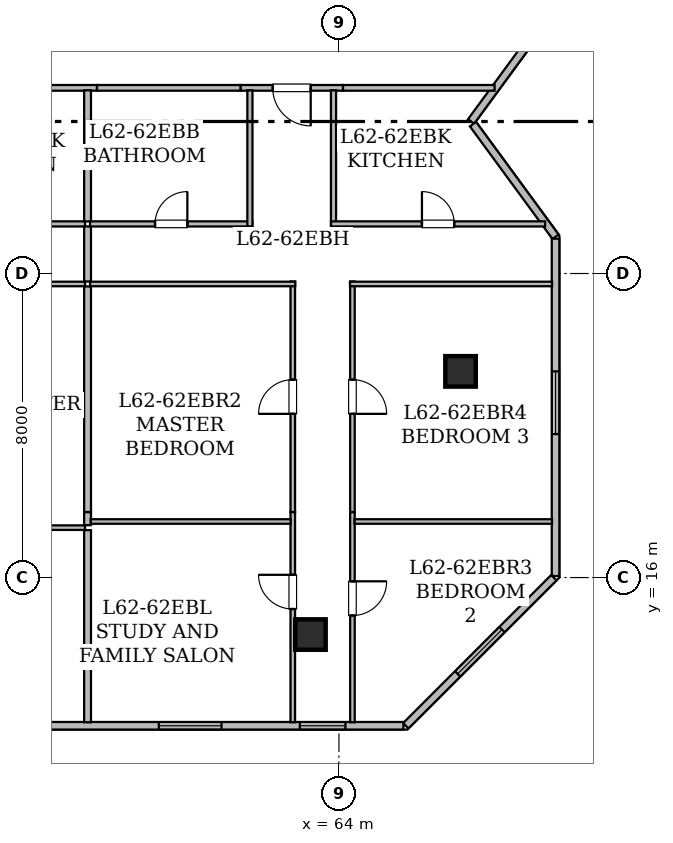
"""IFC4 building model, lengths in metres.
Left out: names, types, materials, properties, quantities, classifications, styles, units other than length and angle.
Written with IfcOpenShell. Run it as: python <this file> out.ifc"""

import sys

from ifc_helpers import new_model, si_unit, direction, frame, frame_2d, origin, origin_2d, place, context, subcontext, project, spatial, rectangle, hollow_rectangle, extrude, element, fill, save


model = new_model("IFC4")
c1 = context("Model", 3, precision=1e-05, world=origin(), true_north=direction((0.0, 1.0)))
c2 = subcontext(c1, "Body", "Model", "MODEL_VIEW")
j1 = project(units=[si_unit("LENGTHUNIT", "METRE"), si_unit("PLANEANGLEUNIT", "RADIAN")], contexts=[c1])
p1 = place(None, origin())
s1 = spatial("IfcSite", under=j1, at=p1, CompositionType="ELEMENT")
p2 = place(p1, origin())
s2 = spatial("IfcBuilding", under=s1, at=p2, CompositionType="ELEMENT")
p3 = place(p2, frame((0.0, 0.0, 242.75)))
s3 = spatial("IfcBuildingStorey", under=s2, at=p3, CompositionType="ELEMENT", Elevation=242.75)
for number, where, z_axis, x_axis in (
    (1, (63.25, 14.5, 0.0), (0.0, 0.0, 1.0), (1.0, 0.0, 0.0)),
    (2, (67.2, 21.425, 0.0), (0.0, 0.0, 1.0), (1.0, 0.0, 0.0)),
):
    element("IfcColumn", number, at=place(p3, frame(where, z_axis=z_axis, x_axis=x_axis)), inside=s3, PredefinedType="COLUMN", context=c2, shape_type="SweptSolid", body=[
        extrude(hollow_rectangle(XDim=0.8, YDim=0.8, WallThickness=0.04, at=origin_2d()), origin(), (0.0, 0.0, 1.0), 3.65),
    ])
p4 = place(p3, frame((69.67, 30.992, 0.0), z_axis=(0.0, 0.0, 1.0), x_axis=(-0.591320870733, -0.806436375566, 0.0)))
e3 = element("IfcWall", 3, at=p4, inside=s3, PredefinedType="STANDARD", context=c2, shape_type="SweptSolid", body=[
    extrude(rectangle(XDim=3.71, YDim=0.2, at=frame_2d((1.855, 0.0))), origin(), (0.0, 0.0, 1.0), 3.43),
])
p5 = place(p3, frame((67.527, 27.931, 0.0), z_axis=(0.0, 0.0, 1.0), x_axis=(0.591248456881, -0.80648946815, 0.0)))
e4 = element("IfcWall", 4, at=p5, inside=s3, PredefinedType="STANDARD", context=c2, shape_type="SweptSolid", body=[
    extrude(rectangle(XDim=3.675, YDim=0.2, at=frame_2d((1.837, 0.0))), origin(), (0.0, 0.0, 1.0), 3.43),
])
p6 = place(p3, frame((69.7, 24.916, 0.0), z_axis=(0.0, 0.0, 1.0), x_axis=(0.0, -1.0, 0.0)))
e5 = element("IfcWall", 5, at=p6, inside=s3, PredefinedType="STANDARD", context=c2, shape_type="SweptSolid", body=[
    extrude(rectangle(XDim=8.875, YDim=0.2, at=frame_2d((4.438, 0.0))), origin(), (0.0, 0.0, 1.0), 3.43),
])
p7 = place(p6, frame((3.491, 0.0, 0.85)))
e6 = element("IfcOpeningElement", 6, at=p7, cuts=e5, PredefinedType="OPENING", context=c2, shape_type="SweptSolid", body=[
    extrude(rectangle(XDim=1.65, YDim=1.55, at=frame_2d((0.825, 0.775))), frame((0.0, 0.11, 0.0), z_axis=(0.0, -1.0, 0.0), x_axis=(1.0, 0.0, 0.0)), (0.0, 0.0, 1.0), 0.22),
])
p8 = place(p3, frame((69.655, 15.996, 0.0), z_axis=(0.0, 0.0, 1.0), x_axis=(-0.707106781187, -0.707106781187, 0.0)))
e7 = element("IfcWall", 7, at=p8, inside=s3, PredefinedType="STANDARD", context=c2, shape_type="SweptSolid", body=[
    extrude(rectangle(XDim=5.51, YDim=0.2, at=frame_2d((2.755, 0.0))), origin(), (0.0, 0.0, 1.0), 3.43),
])
p9 = place(p8, frame((1.93, 0.0, 0.85)))
e8 = element("IfcOpeningElement", 8, at=p9, cuts=e7, PredefinedType="OPENING", context=c2, shape_type="SweptSolid", body=[
    extrude(rectangle(XDim=1.65, YDim=1.55, at=frame_2d((0.825, 0.775))), frame((0.0, 0.11, 0.0), z_axis=(0.0, -1.0, 0.0), x_axis=(1.0, 0.0, 0.0)), (0.0, 0.0, 1.0), 0.22),
])
p10 = place(p3, frame((65.696, 12.1, 0.0), z_axis=(0.0, 0.0, 1.0), x_axis=(-1.0, 0.0, 0.0)))
e9 = element("IfcWall", 9, at=p10, inside=s3, PredefinedType="STANDARD", context=c2, shape_type="SweptSolid", body=[
    extrude(rectangle(XDim=41.393, YDim=0.2, at=frame_2d((20.697, 0.0))), origin(), (0.0, 0.0, 1.0), 3.43),
])
p11 = place(p10, frame((39.16, 0.0, 0.85)))
e10 = element("IfcOpeningElement", 10, at=p11, cuts=e9, PredefinedType="OPENING", context=c2, shape_type="SweptSolid", body=[
    extrude(rectangle(XDim=1.65, YDim=1.55, at=frame_2d((0.825, 0.775))), frame((0.0, 0.11, 0.0), z_axis=(0.0, -1.0, 0.0), x_axis=(1.0, 0.0, 0.0)), (0.0, 0.0, 1.0), 0.22),
])
p12 = place(p10, frame((30.646, 0.0, 0.85)))
e11 = element("IfcOpeningElement", 11, at=p12, cuts=e9, PredefinedType="OPENING", context=c2, shape_type="SweptSolid", body=[
    extrude(rectangle(XDim=1.65, YDim=1.55, at=frame_2d((0.825, 0.775))), frame((0.0, 0.11, 0.0), z_axis=(0.0, -1.0, 0.0), x_axis=(1.0, 0.0, 0.0)), (0.0, 0.0, 1.0), 0.22),
])
p13 = place(p10, frame((25.339, 0.0, 0.85)))
e12 = element("IfcOpeningElement", 12, at=p13, cuts=e9, PredefinedType="OPENING", context=c2, shape_type="SweptSolid", body=[
    extrude(rectangle(XDim=1.65, YDim=1.55, at=frame_2d((0.825, 0.775))), frame((0.0, 0.11, 0.0), z_axis=(0.0, -1.0, 0.0), x_axis=(1.0, 0.0, 0.0)), (0.0, 0.0, 1.0), 0.22),
])
p14 = place(p10, frame((15.596, 0.0, 0.8)))
e13 = element("IfcOpeningElement", 13, at=p14, cuts=e9, PredefinedType="OPENING", context=c2, shape_type="SweptSolid", body=[
    extrude(rectangle(XDim=1.2, YDim=1.5, at=frame_2d((0.6, 0.75))), frame((0.0, 0.11, 0.0), z_axis=(0.0, -1.0, 0.0), x_axis=(1.0, 0.0, 0.0)), (0.0, 0.0, 1.0), 0.22),
])
p15 = place(p10, frame((19.706, 0.0, 0.85)))
e14 = element("IfcOpeningElement", 14, at=p15, cuts=e9, PredefinedType="OPENING", context=c2, shape_type="SweptSolid", body=[
    extrude(rectangle(XDim=1.65, YDim=1.55, at=frame_2d((0.825, 0.775))), frame((0.0, 0.11, 0.0), z_axis=(0.0, -1.0, 0.0), x_axis=(1.0, 0.0, 0.0)), (0.0, 0.0, 1.0), 0.22),
])
p16 = place(p10, frame((11.036, 0.0, 0.85)))
e15 = element("IfcOpeningElement", 15, at=p16, cuts=e9, PredefinedType="OPENING", context=c2, shape_type="SweptSolid", body=[
    extrude(rectangle(XDim=1.65, YDim=1.55, at=frame_2d((0.825, 0.775))), frame((0.0, 0.11, 0.0), z_axis=(0.0, -1.0, 0.0), x_axis=(1.0, 0.0, 0.0)), (0.0, 0.0, 1.0), 0.22),
])
p17 = place(p10, frame((1.526, 0.0, 0.8)))
e16 = element("IfcOpeningElement", 16, at=p17, cuts=e9, PredefinedType="OPENING", context=c2, shape_type="SweptSolid", body=[
    extrude(rectangle(XDim=1.2, YDim=1.5, at=frame_2d((0.6, 0.75))), frame((0.0, 0.11, 0.0), z_axis=(0.0, -1.0, 0.0), x_axis=(1.0, 0.0, 0.0)), (0.0, 0.0, 1.0), 0.22),
])
p18 = place(p10, frame((4.786, 0.0, 0.85)))
e17 = element("IfcOpeningElement", 17, at=p18, cuts=e9, PredefinedType="OPENING", context=c2, shape_type="SweptSolid", body=[
    extrude(rectangle(XDim=1.65, YDim=1.55, at=frame_2d((0.825, 0.775))), frame((0.0, 0.11, 0.0), z_axis=(0.0, -1.0, 0.0), x_axis=(1.0, 0.0, 0.0)), (0.0, 0.0, 1.0), 0.22),
])
p19 = place(p3, frame((57.634, 28.885, 0.0), z_axis=(0.0, 0.0, 1.0), x_axis=(-1.0, 0.0, 0.0)))
e18 = element("IfcWall", 18, at=p19, inside=s3, PredefinedType="STANDARD", context=c2, shape_type="SweptSolid", body=[
    extrude(rectangle(XDim=7.935, YDim=0.15, at=frame_2d((3.968, 0.0))), origin(), (0.0, 0.0, 1.0), 2.725),
])
p20 = place(p3, frame((64.107, 28.885, 0.0), z_axis=(0.0, 0.0, 1.0), x_axis=(-1.0, 0.0, 0.0)))
e19 = element("IfcWall", 19, at=p20, inside=s3, PredefinedType="STANDARD", context=c2, shape_type="SweptSolid", body=[
    extrude(rectangle(XDim=2.699, YDim=0.15, at=frame_2d((1.35, 0.0))), origin(), (0.0, 0.0, 1.0), 3.43),
])
p21 = place(p20, frame((0.85, 0.0, 0.0)))
e20 = element("IfcOpeningElement", 20, at=p21, cuts=e19, PredefinedType="OPENING", context=c2, shape_type="SweptSolid", body=[
    extrude(rectangle(XDim=1.0, YDim=2.15, at=frame_2d((0.5, 1.075))), frame((0.0, 0.085, 0.0), z_axis=(0.0, -1.0, 0.0), x_axis=(1.0, 0.0, 0.0)), (0.0, 0.0, 1.0), 0.17),
])
p22 = place(p3, frame((61.408, 28.885, 0.0), z_axis=(0.0, 0.0, 1.0), x_axis=(-1.0, 0.0, 0.0)))
e21 = element("IfcWall", 21, at=p22, inside=s3, PredefinedType="STANDARD", context=c2, shape_type="SweptSolid", body=[
    extrude(rectangle(XDim=3.774, YDim=0.15, at=frame_2d((1.887, 0.0))), origin(), (0.0, 0.0, 1.0), 3.43),
])
p23 = place(p3, frame((68.096, 28.885, 0.0), z_axis=(0.0, 0.0, 1.0), x_axis=(-1.0, 0.0, 0.0)))
e22 = element("IfcWall", 22, at=p23, inside=s3, PredefinedType="STANDARD", context=c2, shape_type="SweptSolid", body=[
    extrude(rectangle(XDim=3.989, YDim=0.15, at=frame_2d((1.995, 0.0))), origin(), (0.0, 0.0, 1.0), 2.887),
])
p24 = place(p3, frame((49.385, 25.305, 0.0), z_axis=(0.0, 0.0, 1.0), x_axis=(1.0, 0.0, 0.0)))
e23 = element("IfcWall", 23, at=p24, inside=s3, PredefinedType="PARTITIONING", context=c2, shape_type="SweptSolid", body=[
    extrude(rectangle(XDim=7.935, YDim=0.135, at=frame_2d((3.968, 0.0))), origin(), (0.0, 0.0, 1.0), 2.725),
])
p25 = place(p24, frame((3.542, 0.0, 0.0)))
e24 = element("IfcOpeningElement", 24, at=p25, cuts=e23, PredefinedType="OPENING", context=c2, shape_type="SweptSolid", body=[
    extrude(rectangle(XDim=0.85, YDim=2.1, at=frame_2d((0.425, 1.05))), frame((0.0, 0.077, 0.0), z_axis=(0.0, -1.0, 0.0), x_axis=(1.0, 0.0, 0.0)), (0.0, 0.0, 1.0), 0.155),
])
p26 = place(p3, frame((57.32, 23.725, 0.0), z_axis=(0.0, 0.0, 1.0), x_axis=(-1.0, 0.0, 0.0)))
e25 = element("IfcWall", 25, at=p26, inside=s3, PredefinedType="PARTITIONING", context=c2, shape_type="SweptSolid", body=[
    extrude(rectangle(XDim=7.1, YDim=0.12, at=frame_2d((3.55, 0.0))), origin(), (0.0, 0.0, 1.0), 2.725),
])
p27 = place(p26, frame((3.1, 0.0, 0.0)))
e26 = element("IfcOpeningElement", 26, at=p27, cuts=e25, PredefinedType="OPENING", context=c2, shape_type="SweptSolid", body=[
    extrude(rectangle(XDim=0.9, YDim=2.1, at=frame_2d((0.45, 1.05))), frame((0.0, 0.07, 0.0), z_axis=(0.0, -1.0, 0.0), x_axis=(1.0, 0.0, 0.0)), (0.0, 0.0, 1.0), 0.14),
])
p28 = place(p3, frame((57.385, 25.24, 0.0), z_axis=(0.0, 0.0, 1.0), x_axis=(0.0, -1.0, 0.0)))
e27 = element("IfcWall", 27, at=p28, inside=s3, PredefinedType="STANDARD", context=c2, shape_type="SweptSolid", body=[
    extrude(rectangle(XDim=1.45, YDim=0.18, at=frame_2d((0.725, 0.0))), origin(), (0.0, 0.0, 1.0), 3.43),
])
p29 = place(p3, frame((57.385, 28.82, 0.0), z_axis=(0.0, 0.0, 1.0), x_axis=(0.0, -1.0, 0.0)))
e28 = element("IfcWall", 28, at=p29, inside=s3, PredefinedType="STANDARD", context=c2, shape_type="SweptSolid", body=[
    extrude(rectangle(XDim=3.45, YDim=0.18, at=frame_2d((1.725, 0.0))), origin(), (0.0, 0.0, 1.0), 3.43),
])
p30 = place(p3, frame((50.339, 17.313, 0.0), z_axis=(0.0, 0.0, 1.0), x_axis=(1.0, 0.0, 0.0)))
e29 = element("IfcWall", 29, at=p30, inside=s3, PredefinedType="PARTITIONING", context=c2, shape_type="SweptSolid", body=[
    extrude(rectangle(XDim=6.981, YDim=0.12, at=frame_2d((3.49, 0.0))), origin(), (0.0, 0.0, 1.0), 2.725),
])
p31 = place(p3, frame((57.385, 17.248, 0.0), z_axis=(0.0, 0.0, 1.0), x_axis=(0.0, -1.0, 0.0)))
e30 = element("IfcWall", 30, at=p31, inside=s3, PredefinedType="STANDARD", context=c2, shape_type="SweptSolid", body=[
    extrude(rectangle(XDim=5.056, YDim=0.18, at=frame_2d((2.528, 0.0))), origin(), (0.0, 0.0, 1.0), 2.725),
])
p32 = place(p3, frame((57.385, 17.724, 0.0), z_axis=(0.0, 0.0, 1.0), x_axis=(0.0, -1.0, 0.0)))
e31 = element("IfcWall", 31, at=p32, inside=s3, PredefinedType="STANDARD", context=c2, shape_type="SweptSolid", body=[
    extrude(rectangle(XDim=0.346, YDim=0.18, at=frame_2d((0.173, 0.0))), origin(), (0.0, 0.0, 1.0), 3.43),
])
p33 = place(p3, frame((57.385, 23.66, 0.0), z_axis=(0.0, 0.0, 1.0), x_axis=(0.0, -1.0, 0.0)))
e32 = element("IfcWall", 32, at=p33, inside=s3, PredefinedType="STANDARD", context=c2, shape_type="SweptSolid", body=[
    extrude(rectangle(XDim=5.936, YDim=0.18, at=frame_2d((2.968, 0.0))), origin(), (0.0, 0.0, 1.0), 2.725),
])
p34 = place(p3, frame((57.45, 25.305, 0.0), z_axis=(0.0, 0.0, 1.0), x_axis=(1.0, 0.0, 0.0)))
e33 = element("IfcWall", 33, at=p34, inside=s3, PredefinedType="PARTITIONING", context=c2, shape_type="SweptSolid", body=[
    extrude(rectangle(XDim=4.272, YDim=0.135, at=frame_2d((2.136, 0.0))), origin(), (0.0, 0.0, 1.0), 3.43),
])
p35 = place(p34, frame((1.711, 0.0, 0.0)))
e34 = element("IfcOpeningElement", 34, at=p35, cuts=e33, PredefinedType="OPENING", context=c2, shape_type="SweptSolid", body=[
    extrude(rectangle(XDim=0.85, YDim=2.1, at=frame_2d((0.425, 1.05))), frame((0.0, 0.077, 0.0), z_axis=(0.0, -1.0, 0.0), x_axis=(1.0, 0.0, 0.0)), (0.0, 0.0, 1.0), 0.155),
])
for number, where, z_axis, x_axis in (
    (35, (61.657, 25.24, 0.0), (0.0, 0.0, 1.0), (0.0, 1.0, 0.0)),
    (36, (63.857, 28.82, 0.0), (0.0, 0.0, 1.0), (0.0, -1.0, 0.0)),
):
    element("IfcWall", number, at=place(p3, frame(where, z_axis=z_axis, x_axis=x_axis)), inside=s3, PredefinedType="PARTITIONING", context=c2, shape_type="SweptSolid", body=[
        extrude(rectangle(XDim=3.58, YDim=0.135, at=frame_2d((1.79, 0.0))), origin(), (0.0, 0.0, 1.0), 3.43),
    ])
p36 = place(p3, frame((63.792, 25.305, 0.0), z_axis=(0.0, 0.0, 1.0), x_axis=(1.0, 0.0, 0.0)))
e37 = element("IfcWall", 37, at=p36, inside=s3, PredefinedType="PARTITIONING", context=c2, shape_type="SweptSolid", body=[
    extrude(rectangle(XDim=5.633, YDim=0.135, at=frame_2d((2.816, 0.0))), origin(), (0.0, 0.0, 1.0), 2.887),
])
p37 = place(p36, frame((2.392, 0.0, 0.0)))
e38 = element("IfcOpeningElement", 38, at=p37, cuts=e37, PredefinedType="OPENING", context=c2, shape_type="SweptSolid", body=[
    extrude(rectangle(XDim=0.85, YDim=2.1, at=frame_2d((0.425, 1.05))), frame((0.0, 0.077, 0.0), z_axis=(0.0, -1.0, 0.0), x_axis=(1.0, 0.0, 0.0)), (0.0, 0.0, 1.0), 0.155),
])
p38 = place(p3, frame((62.785, 12.192, 0.0), z_axis=(0.0, 0.0, 1.0), x_axis=(0.0, 1.0, 0.0)))
e39 = element("IfcWall", 39, at=p38, inside=s3, PredefinedType="PARTITIONING", context=c2, shape_type="SweptSolid", body=[
    extrude(rectangle(XDim=5.532, YDim=0.12, at=frame_2d((2.766, 0.0))), origin(), (0.0, 0.0, 1.0), 2.725),
])
p39 = place(p38, frame((2.98, 0.0, 0.0)))
e40 = element("IfcOpeningElement", 40, at=p39, cuts=e39, PredefinedType="OPENING", context=c2, shape_type="SweptSolid", body=[
    extrude(rectangle(XDim=0.9, YDim=2.1, at=frame_2d((0.45, 1.05))), frame((0.0, 0.07, 0.0), z_axis=(0.0, -1.0, 0.0), x_axis=(1.0, 0.0, 0.0)), (0.0, 0.0, 1.0), 0.14),
])
p40 = place(p3, frame((62.785, 17.724, 0.0), z_axis=(0.0, 0.0, 1.0), x_axis=(0.0, 1.0, 0.0)))
e41 = element("IfcWall", 41, at=p40, inside=s3, PredefinedType="PARTITIONING", context=c2, shape_type="SweptSolid", body=[
    extrude(rectangle(XDim=6.066, YDim=0.12, at=frame_2d((3.033, 0.0))), origin(), (0.0, 0.0, 1.0), 2.725),
])
p41 = place(p40, frame((2.583, 0.0, 0.0)))
e42 = element("IfcOpeningElement", 42, at=p41, cuts=e41, PredefinedType="OPENING", context=c2, shape_type="SweptSolid", body=[
    extrude(rectangle(XDim=0.9, YDim=2.1, at=frame_2d((0.45, 1.05))), frame((0.0, 0.07, 0.0), z_axis=(0.0, -1.0, 0.0), x_axis=(1.0, 0.0, 0.0)), (0.0, 0.0, 1.0), 0.14),
])
p42 = place(p3, frame((62.85, 23.725, 0.0), z_axis=(0.0, 0.0, 1.0), x_axis=(-1.0, 0.0, 0.0)))
e43 = element("IfcWall", 43, at=p42, inside=s3, PredefinedType="PARTITIONING", context=c2, shape_type="SweptSolid", body=[
    extrude(rectangle(XDim=5.4, YDim=0.12, at=frame_2d((2.7, 0.0))), origin(), (0.0, 0.0, 1.0), 3.43),
])
p43 = place(p3, frame((64.355, 17.724, 0.0), z_axis=(0.0, 0.0, 1.0), x_axis=(0.0, -1.0, 0.0)))
e44 = element("IfcWall", 44, at=p43, inside=s3, PredefinedType="PARTITIONING", context=c2, shape_type="SweptSolid", body=[
    extrude(rectangle(XDim=5.532, YDim=0.12, at=frame_2d((2.766, 0.0))), origin(), (0.0, 0.0, 1.0), 2.887),
])
p44 = place(p43, frame((1.823, 0.0, 0.0)))
e45 = element("IfcOpeningElement", 45, at=p44, cuts=e44, PredefinedType="OPENING", context=c2, shape_type="SweptSolid", body=[
    extrude(rectangle(XDim=0.9, YDim=2.1, at=frame_2d((0.45, 1.05))), frame((0.0, 0.07, 0.0), z_axis=(0.0, -1.0, 0.0), x_axis=(1.0, 0.0, 0.0)), (0.0, 0.0, 1.0), 0.14),
])
p45 = place(p3, frame((64.355, 23.79, 0.0), z_axis=(0.0, 0.0, 1.0), x_axis=(0.0, -1.0, 0.0)))
e46 = element("IfcWall", 46, at=p45, inside=s3, PredefinedType="PARTITIONING", context=c2, shape_type="SweptSolid", body=[
    extrude(rectangle(XDim=6.066, YDim=0.12, at=frame_2d((3.033, 0.0))), origin(), (0.0, 0.0, 1.0), 2.725),
])
p46 = place(p45, frame((2.583, 0.0, 0.0)))
e47 = element("IfcOpeningElement", 47, at=p46, cuts=e46, PredefinedType="OPENING", context=c2, shape_type="SweptSolid", body=[
    extrude(rectangle(XDim=0.9, YDim=2.1, at=frame_2d((0.45, 1.05))), frame((0.0, 0.07, 0.0), z_axis=(0.0, -1.0, 0.0), x_axis=(1.0, 0.0, 0.0)), (0.0, 0.0, 1.0), 0.14),
])
p47 = place(p3, frame((69.608, 23.725, 0.0), z_axis=(0.0, 0.0, 1.0), x_axis=(-1.0, 0.0, 0.0)))
e48 = element("IfcWall", 48, at=p47, inside=s3, PredefinedType="PARTITIONING", context=c2, shape_type="SweptSolid", body=[
    extrude(rectangle(XDim=5.318, YDim=0.12, at=frame_2d((2.659, 0.0))), origin(), (0.0, 0.0, 1.0), 2.887),
])
p48 = place(p3, frame((57.467, 17.475, 0.0), z_axis=(0.0, 0.0, 1.0), x_axis=(1.0, 0.0, 0.0)))
e49 = element("IfcWall", 49, at=p48, inside=s3, PredefinedType="PARTITIONING", context=c2, shape_type="SweptSolid", body=[
    extrude(rectangle(XDim=5.264, YDim=0.12, at=frame_2d((2.632, 0.0))), origin(), (0.0, 0.0, 1.0), 3.43),
])
p49 = place(p3, frame((64.409, 17.475, 0.0), z_axis=(0.0, 0.0, 1.0), x_axis=(1.0, 0.0, 0.0)))
e50 = element("IfcWall", 50, at=p49, inside=s3, PredefinedType="PARTITIONING", context=c2, shape_type="SweptSolid", body=[
    extrude(rectangle(XDim=5.199, YDim=0.12, at=frame_2d((2.6, 0.0))), origin(), (0.0, 0.0, 1.0), 2.887),
])
p50 = place(p17, origin())
e51 = element("IfcWindow", 51, at=p50, inside=s3, PartitioningType="SINGLE_PANEL", PredefinedType="WINDOW", context=c2, shape_type="SweptSolid", body=[
    extrude(rectangle(XDim=1.2, YDim=1.5, at=frame_2d((0.6, 0.75))), frame((0.0, 0.03, 0.0), z_axis=(0.0, -1.0, 0.0), x_axis=(1.0, 0.0, 0.0)), (0.0, 0.0, 1.0), 0.06),
])
fill(e16, e51)
p51 = place(p18, origin())
e52 = element("IfcWindow", 52, at=p51, inside=s3, PartitioningType="SINGLE_PANEL", PredefinedType="WINDOW", context=c2, shape_type="SweptSolid", body=[
    extrude(rectangle(XDim=1.65, YDim=1.55, at=frame_2d((0.825, 0.775))), frame((0.0, 0.03, 0.0), z_axis=(0.0, -1.0, 0.0), x_axis=(1.0, 0.0, 0.0)), (0.0, 0.0, 1.0), 0.06),
])
fill(e17, e52)
p52 = place(p9, origin())
e53 = element("IfcWindow", 53, at=p52, inside=s3, PartitioningType="SINGLE_PANEL", PredefinedType="WINDOW", context=c2, shape_type="SweptSolid", body=[
    extrude(rectangle(XDim=1.65, YDim=1.55, at=frame_2d((0.825, 0.775))), frame((0.0, 0.03, 0.0), z_axis=(0.0, -1.0, 0.0), x_axis=(1.0, 0.0, 0.0)), (0.0, 0.0, 1.0), 0.06),
])
fill(e8, e53)
p53 = place(p7, origin())
e54 = element("IfcWindow", 54, at=p53, inside=s3, PartitioningType="SINGLE_PANEL", PredefinedType="WINDOW", context=c2, shape_type="SweptSolid", body=[
    extrude(rectangle(XDim=1.65, YDim=1.55, at=frame_2d((0.825, 0.775))), frame((0.0, 0.03, 0.0), z_axis=(0.0, -1.0, 0.0), x_axis=(1.0, 0.0, 0.0)), (0.0, 0.0, 1.0), 0.06),
])
fill(e6, e54)
p54 = place(p21, origin())
e55 = element("IfcDoor", 55, at=p54, inside=s3, OperationType="SINGLE_SWING_LEFT", PredefinedType="DOOR", context=c2, shape_type="SweptSolid", body=[
    extrude(rectangle(XDim=1.0, YDim=2.15, at=frame_2d((0.5, 1.075))), frame((0.0, 0.025, 0.0), z_axis=(0.0, -1.0, 0.0), x_axis=(1.0, 0.0, 0.0)), (0.0, 0.0, 1.0), 0.05),
])
fill(e20, e55)
p55 = place(p35, origin())
e56 = element("IfcDoor", 56, at=p55, inside=s3, OperationType="SINGLE_SWING_RIGHT", PredefinedType="DOOR", context=c2, shape_type="SweptSolid", body=[
    extrude(rectangle(XDim=0.85, YDim=2.1, at=frame_2d((0.425, 1.05))), frame((0.0, 0.025, 0.0), z_axis=(0.0, -1.0, 0.0), x_axis=(1.0, 0.0, 0.0)), (0.0, 0.0, 1.0), 0.05),
])
fill(e34, e56)
p56 = place(p37, origin())
e57 = element("IfcDoor", 57, at=p56, inside=s3, OperationType="SINGLE_SWING_LEFT", PredefinedType="DOOR", context=c2, shape_type="SweptSolid", body=[
    extrude(rectangle(XDim=0.85, YDim=2.1, at=frame_2d((0.425, 1.05))), frame((0.0, 0.025, 0.0), z_axis=(0.0, -1.0, 0.0), x_axis=(1.0, 0.0, 0.0)), (0.0, 0.0, 1.0), 0.05),
])
fill(e38, e57)
p57 = place(p39, origin())
e58 = element("IfcDoor", 58, at=p57, inside=s3, OperationType="SINGLE_SWING_RIGHT", PredefinedType="DOOR", context=c2, shape_type="SweptSolid", body=[
    extrude(rectangle(XDim=0.9, YDim=2.1, at=frame_2d((0.45, 1.05))), frame((0.0, 0.025, 0.0), z_axis=(0.0, -1.0, 0.0), x_axis=(1.0, 0.0, 0.0)), (0.0, 0.0, 1.0), 0.05),
])
fill(e40, e58)
p58 = place(p41, origin())
e59 = element("IfcDoor", 59, at=p58, inside=s3, OperationType="SINGLE_SWING_LEFT", PredefinedType="DOOR", context=c2, shape_type="SweptSolid", body=[
    extrude(rectangle(XDim=0.9, YDim=2.1, at=frame_2d((0.45, 1.05))), frame((0.0, 0.025, 0.0), z_axis=(0.0, -1.0, 0.0), x_axis=(1.0, 0.0, 0.0)), (0.0, 0.0, 1.0), 0.05),
])
fill(e42, e59)
p59 = place(p44, origin())
e60 = element("IfcDoor", 60, at=p59, inside=s3, OperationType="SINGLE_SWING_LEFT", PredefinedType="DOOR", context=c2, shape_type="SweptSolid", body=[
    extrude(rectangle(XDim=0.9, YDim=2.1, at=frame_2d((0.45, 1.05))), frame((0.0, 0.025, 0.0), z_axis=(0.0, -1.0, 0.0), x_axis=(1.0, 0.0, 0.0)), (0.0, 0.0, 1.0), 0.05),
])
fill(e45, e60)
p60 = place(p46, origin())
e61 = element("IfcDoor", 61, at=p60, inside=s3, OperationType="SINGLE_SWING_RIGHT", PredefinedType="DOOR", context=c2, shape_type="SweptSolid", body=[
    extrude(rectangle(XDim=0.9, YDim=2.1, at=frame_2d((0.45, 1.05))), frame((0.0, 0.025, 0.0), z_axis=(0.0, -1.0, 0.0), x_axis=(1.0, 0.0, 0.0)), (0.0, 0.0, 1.0), 0.05),
])
fill(e47, e61)
save(model, sys.argv[1])
